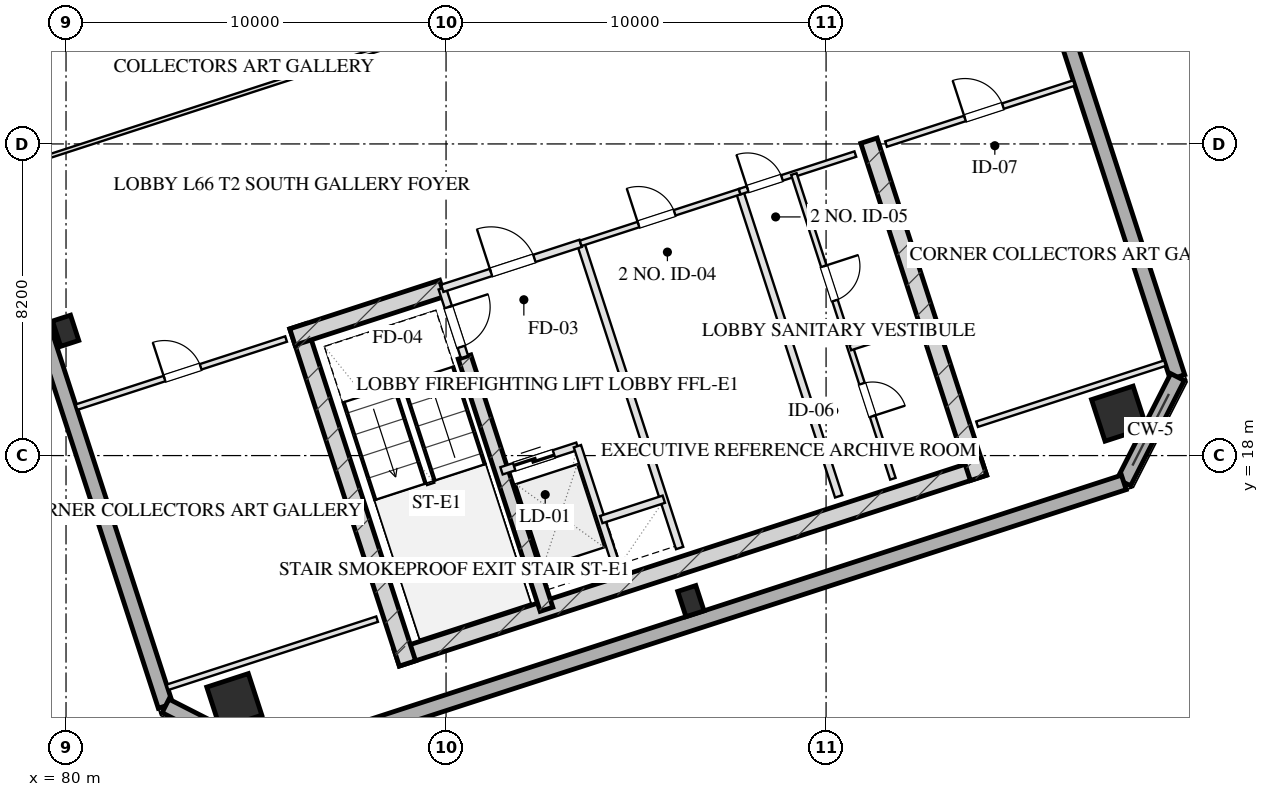
"""IFC4 building model, lengths in metres.
Left out: names, types, materials, properties, quantities, classifications, styles, units other than length and angle.
Written with IfcOpenShell. Run it as: python <this file> out.ifc"""

import sys

from ifc_helpers import new_model, si_unit, direction, frame, frame_2d, origin, origin_2d, place, context, subcontext, project, spatial, rectangle, hollow_rectangle, extrude, element, fill, save


model = new_model("IFC4")
c1 = context("Model", 3, precision=1e-05, world=origin(), true_north=direction((0.0, 1.0)))
c2 = subcontext(c1, "Body", "Model", "MODEL_VIEW")
j1 = project(units=[si_unit("LENGTHUNIT", "METRE"), si_unit("PLANEANGLEUNIT", "RADIAN")], contexts=[c1])
p1 = place(None, origin())
s1 = spatial("IfcSite", under=j1, at=p1, CompositionType="ELEMENT")
p2 = place(p1, origin())
s2 = spatial("IfcBuilding", under=s1, at=p2, CompositionType="ELEMENT")
p3 = place(p2, frame((0.0, 0.0, 244.0)))
s3 = spatial("IfcBuildingStorey", under=s2, at=p3, CompositionType="ELEMENT", Elevation=244.0)
p4 = place(p3, frame((88.701, 12.675, 0.0), z_axis=(0.0, 0.0, 1.0), x_axis=(0.95105824505, 0.309011673763, 0.0)))
e1 = element("IfcWall", 1, at=p4, inside=s3, PredefinedType="SHEAR", context=c2, shape_type="SweptSolid", body=[
    extrude(rectangle(XDim=16.25, YDim=0.45, at=frame_2d((8.125, 0.0))), origin(), (0.0, 0.0, 1.0), 3.2),
])
for number, where, z_axis, x_axis in (
    (2, (86.102, 21.404, 0.0), (0.0, 0.0, 1.0), (0.309, -0.951, 0.0)),
    (3, (101.128, 26.286, 0.0), (0.0, 0.0, 1.0), (0.309, -0.951, 0.0)),
):
    element("IfcWall", number, at=place(p3, frame(where, z_axis=z_axis, x_axis=x_axis)), inside=s3, PredefinedType="SHEAR", context=c2, shape_type="SweptSolid", body=[
        extrude(rectangle(XDim=9.33, YDim=0.45, at=frame_2d((4.665, 0.0))), origin(), (0.0, 0.0, 1.0), 3.2),
    ])
p5 = place(p3, frame((90.486, 20.594, 0.0), z_axis=(0.0, 0.0, 1.0), x_axis=(0.309020428229, -0.951055400562, 0.0)))
e4 = element("IfcWall", 4, at=p5, inside=s3, PredefinedType="SHEAR", context=c2, shape_type="SweptSolid", body=[
    extrude(rectangle(XDim=6.98, YDim=0.35, at=frame_2d((3.49, 0.0))), origin(), (0.0, 0.0, 1.0), 3.2),
])
p6 = place(p3, frame((85.957, 21.12, 0.0), z_axis=(0.0, 0.0, 1.0), x_axis=(0.951064796122, 0.308991510526, 0.0)))
e5 = element("IfcWall", 5, at=p6, inside=s3, PredefinedType="SHEAR", context=c2, shape_type="SweptSolid", body=[
    extrude(rectangle(XDim=4.145, YDim=0.45, at=frame_2d((2.073, 0.0))), origin(), (0.0, 0.0, 1.0), 3.2),
])
for number, where, z_axis, x_axis in (
    (6, (84.428, 11.539, 0.0), (0.0, 0.0, 1.0), (0.951, 0.309, 0.0)),
    (7, (107.71, 19.104, 0.0), (0.0, 0.0, 1.0), (0.951, 0.309, 0.0)),
):
    element("IfcColumn", number, at=place(p3, frame(where, z_axis=z_axis, x_axis=x_axis)), inside=s3, PredefinedType="COLUMN", context=c2, shape_type="SweptSolid", body=[
        extrude(hollow_rectangle(XDim=1.15, YDim=1.15, WallThickness=0.04, at=origin_2d()), origin(), (0.0, 0.0, 1.0), 3.201),
    ])
for number, where, z_axis, x_axis in (
    (8, (79.99, 21.284, 0.0), (0.0, 0.0, 1.0), (0.951, 0.309, 0.0)),
    (9, (96.443, 14.17, 0.0), (0.0, 0.0, 1.0), (0.951, 0.309, 0.0)),
):
    element("IfcColumn", number, at=place(p3, frame(where, z_axis=z_axis, x_axis=x_axis)), inside=s3, PredefinedType="COLUMN", context=c2, shape_type="SweptSolid", body=[
        extrude(hollow_rectangle(XDim=0.5, YDim=0.7, WallThickness=0.025, at=origin_2d()), origin(), (0.0, 0.0, 1.0), 3.201),
    ])
p7 = place(p3, frame((82.618, 11.414, 0.0), z_axis=(0.0, 0.0, 1.0), x_axis=(-0.309016491071, 0.951056679828, 0.0)))
e10 = element("IfcWall", 10, at=p7, inside=s3, PredefinedType="SOLIDWALL", context=c2, shape_type="SweptSolid", body=[
    extrude(rectangle(XDim=38.4, YDim=0.4, at=frame_2d((19.2, 0.0))), origin(), (0.0, 0.0, 1.0), 2.36),
])
p8 = place(p7, frame((11.825, 0.0, 0.75)))
e11 = element("IfcOpeningElement", 11, at=p8, cuts=e10, PredefinedType="OPENING", context=c2, shape_type="SweptSolid", body=[
    extrude(rectangle(XDim=1.95, YDim=1.21, at=frame_2d((0.975, 0.605))), frame((0.0, 0.21, 0.0), z_axis=(0.0, -1.0, 0.0), x_axis=(1.0, 0.0, 0.0)), (0.0, 0.0, 1.0), 0.42),
])
p9 = place(p7, frame((15.625, 0.0, 0.75)))
e12 = element("IfcOpeningElement", 12, at=p9, cuts=e10, PredefinedType="OPENING", context=c2, shape_type="SweptSolid", body=[
    extrude(rectangle(XDim=1.95, YDim=1.21, at=frame_2d((0.975, 0.605))), frame((0.0, 0.21, 0.0), z_axis=(0.0, -1.0, 0.0), x_axis=(1.0, 0.0, 0.0)), (0.0, 0.0, 1.0), 0.42),
])
p10 = place(p7, frame((20.825, 0.0, 0.75)))
e13 = element("IfcOpeningElement", 13, at=p10, cuts=e10, PredefinedType="OPENING", context=c2, shape_type="SweptSolid", body=[
    extrude(rectangle(XDim=1.95, YDim=1.21, at=frame_2d((0.975, 0.605))), frame((0.0, 0.21, 0.0), z_axis=(0.0, -1.0, 0.0), x_axis=(1.0, 0.0, 0.0)), (0.0, 0.0, 1.0), 0.42),
])
p11 = place(p7, frame((24.625, 0.0, 0.75)))
e14 = element("IfcOpeningElement", 14, at=p11, cuts=e10, PredefinedType="OPENING", context=c2, shape_type="SweptSolid", body=[
    extrude(rectangle(XDim=1.95, YDim=1.21, at=frame_2d((0.975, 0.605))), frame((0.0, 0.21, 0.0), z_axis=(0.0, -1.0, 0.0), x_axis=(1.0, 0.0, 0.0)), (0.0, 0.0, 1.0), 0.42),
])
p12 = place(p3, frame((97.382, 56.586, 0.0), z_axis=(0.0, 0.0, 1.0), x_axis=(0.309016491071, -0.951056679828, 0.0)))
e15 = element("IfcWall", 15, at=p12, inside=s3, PredefinedType="SOLIDWALL", context=c2, shape_type="SweptSolid", body=[
    extrude(rectangle(XDim=38.4, YDim=0.4, at=frame_2d((19.2, 0.0))), origin(), (0.0, 0.0, 1.0), 2.36),
])
p13 = place(p12, frame((24.625, 0.0, 0.75)))
e16 = element("IfcOpeningElement", 16, at=p13, cuts=e15, PredefinedType="OPENING", context=c2, shape_type="SweptSolid", body=[
    extrude(rectangle(XDim=1.95, YDim=1.21, at=frame_2d((0.975, 0.605))), frame((0.0, 0.21, 0.0), z_axis=(0.0, -1.0, 0.0), x_axis=(1.0, 0.0, 0.0)), (0.0, 0.0, 1.0), 0.42),
])
p14 = place(p12, frame((20.825, 0.0, 0.75)))
e17 = element("IfcOpeningElement", 17, at=p14, cuts=e15, PredefinedType="OPENING", context=c2, shape_type="SweptSolid", body=[
    extrude(rectangle(XDim=1.95, YDim=1.21, at=frame_2d((0.975, 0.605))), frame((0.0, 0.21, 0.0), z_axis=(0.0, -1.0, 0.0), x_axis=(1.0, 0.0, 0.0)), (0.0, 0.0, 1.0), 0.42),
])
p15 = place(p12, frame((15.625, 0.0, 0.75)))
e18 = element("IfcOpeningElement", 18, at=p15, cuts=e15, PredefinedType="OPENING", context=c2, shape_type="SweptSolid", body=[
    extrude(rectangle(XDim=1.95, YDim=1.21, at=frame_2d((0.975, 0.605))), frame((0.0, 0.21, 0.0), z_axis=(0.0, -1.0, 0.0), x_axis=(1.0, 0.0, 0.0)), (0.0, 0.0, 1.0), 0.42),
])
p16 = place(p12, frame((11.825, 0.0, 0.75)))
e19 = element("IfcOpeningElement", 19, at=p16, cuts=e15, PredefinedType="OPENING", context=c2, shape_type="SweptSolid", body=[
    extrude(rectangle(XDim=1.95, YDim=1.21, at=frame_2d((0.975, 0.605))), frame((0.0, 0.21, 0.0), z_axis=(0.0, -1.0, 0.0), x_axis=(1.0, 0.0, 0.0)), (0.0, 0.0, 1.0), 0.42),
])
p17 = place(p3, frame((109.248, 20.066, 0.0), z_axis=(0.0, 0.0, 1.0), x_axis=(-0.453949291228, -0.891027519774, 0.0)))
e20 = element("IfcWall", 20, at=p17, inside=s3, PredefinedType="SOLIDWALL", context=c2, shape_type="SweptSolid", body=[
    extrude(rectangle(XDim=3.111, YDim=0.4, at=frame_2d((1.556, 0.0))), origin(), (0.0, 0.0, 1.0), 2.36),
])
p18 = place(p3, frame((107.835, 17.294, 0.0), z_axis=(0.0, 0.0, 1.0), x_axis=(-0.951058012937, -0.309012388148, 0.0)))
e21 = element("IfcWall", 21, at=p18, inside=s3, PredefinedType="SOLIDWALL", context=c2, shape_type="SweptSolid", body=[
    extrude(rectangle(XDim=23.6, YDim=0.4, at=frame_2d((11.8, 0.0))), origin(), (0.0, 0.0, 1.0), 2.36),
])
p19 = place(p3, frame((85.39, 10.001, 0.0), z_axis=(0.0, 0.0, 1.0), x_axis=(-0.890979603174, 0.454043331334, 0.0)))
e22 = element("IfcWall", 22, at=p19, inside=s3, PredefinedType="SOLIDWALL", context=c2, shape_type="SweptSolid", body=[
    extrude(rectangle(XDim=3.111, YDim=0.4, at=frame_2d((1.556, 0.0))), origin(), (0.0, 0.0, 1.0), 2.36),
])
p20 = place(p3, frame((89.899, 22.401, 0.0), z_axis=(0.0, 0.0, 1.0), x_axis=(0.308932062672, -0.951084108086, 0.0)))
e23 = element("IfcWall", 23, at=p20, inside=s3, PredefinedType="PARTITIONING", context=c2, shape_type="SweptSolid", body=[
    extrude(rectangle(XDim=1.9, YDim=0.2, at=frame_2d((0.95, 0.0))), origin(), (0.0, 0.0, 1.0), 2.925),
])
p21 = place(p20, frame((0.52, 0.0, 0.0)))
e24 = element("IfcOpeningElement", 24, at=p21, cuts=e23, PredefinedType="OPENING", context=c2, shape_type="SweptSolid", body=[
    extrude(rectangle(XDim=1.1, YDim=2.05, at=frame_2d((0.55, 1.025))), frame((0.0, 0.11, 0.0), z_axis=(0.0, -1.0, 0.0), x_axis=(1.0, 0.0, 0.0)), (0.0, 0.0, 1.0), 0.22),
])
p22 = place(p3, frame((93.542, 23.585, 0.0), z_axis=(0.0, 0.0, 1.0), x_axis=(0.309042196757, -0.951048327176, 0.0)))
e25 = element("IfcWall", 25, at=p22, inside=s3, PredefinedType="PARTITIONING", context=c2, shape_type="SweptSolid", body=[
    extrude(rectangle(XDim=8.43, YDim=0.2, at=frame_2d((4.215, 0.0))), origin(), (0.0, 0.0, 1.0), 2.925),
])
p23 = place(p3, frame((89.899, 22.401, 0.0), z_axis=(0.0, 0.0, 1.0), x_axis=(0.951046716504, 0.309047153403, 0.0)))
e26 = element("IfcWall", 26, at=p23, inside=s3, PredefinedType="PARTITIONING", context=c2, shape_type="SweptSolid", body=[
    extrude(rectangle(XDim=3.83, YDim=0.2, at=frame_2d((1.915, 0.0))), origin(), (0.0, 0.0, 1.0), 2.925),
])
p24 = place(p23, frame((1.35, 0.0, 0.0)))
e27 = element("IfcOpeningElement", 27, at=p24, cuts=e26, PredefinedType="OPENING", context=c2, shape_type="SweptSolid", body=[
    extrude(rectangle(XDim=1.2, YDim=2.05, at=frame_2d((0.6, 1.025))), frame((0.0, 0.11, 0.0), z_axis=(0.0, -1.0, 0.0), x_axis=(1.0, 0.0, 0.0)), (0.0, 0.0, 1.0), 0.22),
])
p25 = place(p3, frame((91.46, 17.598, 0.0), z_axis=(0.0, 0.0, 1.0), x_axis=(0.951062257173, 0.308999325213, 0.0)))
e28 = element("IfcWall", 28, at=p25, inside=s3, PredefinedType="PARTITIONING", context=c2, shape_type="SweptSolid", body=[
    extrude(rectangle(XDim=2.1, YDim=0.2, at=frame_2d((1.05, 0.0))), origin(), (0.0, 0.0, 1.0), 2.925),
])
p26 = place(p25, frame((0.35, 0.0, 0.0)))
e29 = element("IfcOpeningElement", 29, at=p26, cuts=e28, PredefinedType="OPENING", context=c2, shape_type="SweptSolid", body=[
    extrude(rectangle(XDim=1.1, YDim=2.05, at=frame_2d((0.55, 1.025))), frame((0.0, 0.11, 0.0), z_axis=(0.0, -1.0, 0.0), x_axis=(1.0, 0.0, 0.0)), (0.0, 0.0, 1.0), 0.22),
])
p27 = place(p3, frame((93.457, 18.247, 0.0), z_axis=(0.0, 0.0, 1.0), x_axis=(0.3089935693, -0.951064127245, 0.0)))
e30 = element("IfcWall", 30, at=p27, inside=s3, PredefinedType="PARTITIONING", context=c2, shape_type="SweptSolid", body=[
    extrude(rectangle(XDim=3.7, YDim=0.2, at=frame_2d((1.85, 0.0))), origin(), (0.0, 0.0, 1.0), 2.925),
])
p28 = place(p3, frame((94.084, 16.317, 0.0), z_axis=(0.0, 0.0, 1.0), x_axis=(0.951041328149, 0.309063734775, 0.0)))
e31 = element("IfcWall", 31, at=p28, inside=s3, PredefinedType="PARTITIONING", context=c2, shape_type="SweptSolid", body=[
    extrude(rectangle(XDim=1.73, YDim=0.2, at=frame_2d((0.865, 0.0))), origin(), (0.0, 0.0, 1.0), 2.925),
])
p29 = place(p3, frame((97.727, 24.944, 0.0), z_axis=(0.0, 0.0, 1.0), x_axis=(0.309016001439, -0.951056838919, 0.0)))
e32 = element("IfcWall", 32, at=p29, inside=s3, PredefinedType="PARTITIONING", context=c2, shape_type="SweptSolid", body=[
    extrude(rectangle(XDim=8.43, YDim=0.2, at=frame_2d((4.215, 0.0))), origin(), (0.0, 0.0, 1.0), 2.925),
])
p30 = place(p3, frame((93.542, 23.585, 0.0), z_axis=(0.0, 0.0, 1.0), x_axis=(0.951063829732, 0.308994485023, 0.0)))
e33 = element("IfcWall", 33, at=p30, inside=s3, PredefinedType="PARTITIONING", context=c2, shape_type="SweptSolid", body=[
    extrude(rectangle(XDim=4.4, YDim=0.15, at=frame_2d((2.2, 0.0))), origin(), (0.0, 0.0, 1.0), 2.925),
])
p31 = place(p30, frame((1.6, 0.0, 0.0)))
e34 = element("IfcOpeningElement", 34, at=p31, cuts=e33, PredefinedType="OPENING", context=c2, shape_type="SweptSolid", body=[
    extrude(rectangle(XDim=1.0, YDim=2.05, at=frame_2d((0.5, 1.025))), frame((0.0, 0.085, 0.0), z_axis=(0.0, -1.0, 0.0), x_axis=(1.0, 0.0, 0.0)), (0.0, 0.0, 1.0), 0.17),
])
p32 = place(p3, frame((97.727, 24.944, 0.0), z_axis=(0.0, 0.0, 1.0), x_axis=(0.951036872128, 0.309077446369, 0.0)))
e35 = element("IfcWall", 35, at=p32, inside=s3, PredefinedType="PARTITIONING", context=c2, shape_type="SweptSolid", body=[
    extrude(rectangle(XDim=3.2, YDim=0.15, at=frame_2d((1.6, 0.0))), origin(), (0.0, 0.0, 1.0), 2.925),
])
p33 = place(p32, frame((0.22, 0.0, 0.0)))
e36 = element("IfcOpeningElement", 36, at=p33, cuts=e35, PredefinedType="OPENING", context=c2, shape_type="SweptSolid", body=[
    extrude(rectangle(XDim=0.95, YDim=2.05, at=frame_2d((0.475, 1.025))), frame((0.0, 0.085, 0.0), z_axis=(0.0, -1.0, 0.0), x_axis=(1.0, 0.0, 0.0)), (0.0, 0.0, 1.0), 0.17),
])
p34 = place(p3, frame((99.153, 25.408, 0.0), z_axis=(0.0, 0.0, 1.0), x_axis=(0.309016001439, -0.951056838919, 0.0)))
e37 = element("IfcWall", 37, at=p34, inside=s3, PredefinedType="PARTITIONING", context=c2, shape_type="SweptSolid", body=[
    extrude(rectangle(XDim=8.43, YDim=0.15, at=frame_2d((4.215, 0.0))), origin(), (0.0, 0.0, 1.0), 2.925),
])
p35 = place(p34, frame((2.55, 0.0, 0.0)))
e38 = element("IfcOpeningElement", 38, at=p35, cuts=e37, PredefinedType="OPENING", context=c2, shape_type="SweptSolid", body=[
    extrude(rectangle(XDim=0.95, YDim=2.05, at=frame_2d((0.475, 1.025))), frame((0.0, 0.085, 0.0), z_axis=(0.0, -1.0, 0.0), x_axis=(1.0, 0.0, 0.0)), (0.0, 0.0, 1.0), 0.17),
])
p36 = place(p34, frame((5.8, 0.0, 0.0)))
e39 = element("IfcOpeningElement", 39, at=p36, cuts=e37, PredefinedType="OPENING", context=c2, shape_type="SweptSolid", body=[
    extrude(rectangle(XDim=0.9, YDim=2.05, at=frame_2d((0.45, 1.025))), frame((0.0, 0.085, 0.0), z_axis=(0.0, -1.0, 0.0), x_axis=(1.0, 0.0, 0.0)), (0.0, 0.0, 1.0), 0.17),
])
p37 = place(p3, frame((100.636, 20.843, 0.0), z_axis=(0.0, 0.0, 1.0), x_axis=(0.951040401051, 0.309066587596, 0.0)))
e40 = element("IfcWall", 40, at=p37, inside=s3, PredefinedType="PARTITIONING", context=c2, shape_type="SweptSolid", body=[
    extrude(rectangle(XDim=1.7, YDim=0.15, at=frame_2d((0.85, 0.0))), origin(), (0.0, 0.0, 1.0), 2.925),
])
p38 = place(p3, frame((82.669, 11.903, 0.0), z_axis=(0.0, 0.0, 1.0), x_axis=(0.951059431056, 0.309008023519, 0.0)))
e41 = element("IfcWall", 41, at=p38, inside=s3, PredefinedType="PARTITIONING", context=c2, shape_type="SweptSolid", body=[
    extrude(rectangle(XDim=5.8, YDim=0.15, at=frame_2d((2.9, 0.0))), origin(), (0.0, 0.0, 1.0), 2.925),
])
p39 = place(p3, frame((80.275, 19.274, 0.0), z_axis=(0.0, 0.0, 1.0), x_axis=(0.951059431056, 0.309008023519, 0.0)))
e42 = element("IfcWall", 42, at=p39, inside=s3, PredefinedType="PARTITIONING", context=c2, shape_type="SweptSolid", body=[
    extrude(rectangle(XDim=5.8, YDim=0.15, at=frame_2d((2.9, 0.0))), origin(), (0.0, 0.0, 1.0), 2.925),
])
p40 = place(p39, frame((2.436, 0.0, 0.0)))
e43 = element("IfcOpeningElement", 43, at=p40, cuts=e42, PredefinedType="OPENING", context=c2, shape_type="SweptSolid", body=[
    extrude(rectangle(XDim=1.0, YDim=2.05, at=frame_2d((0.5, 1.025))), frame((0.0, 0.085, 0.0), z_axis=(0.0, -1.0, 0.0), x_axis=(1.0, 0.0, 0.0)), (0.0, 0.0, 1.0), 0.17),
])
p41 = place(p3, frame((103.973, 18.825, 0.0), z_axis=(0.0, 0.0, 1.0), x_axis=(0.951055112834, 0.309021313752, 0.0)))
e44 = element("IfcWall", 44, at=p41, inside=s3, PredefinedType="PARTITIONING", context=c2, shape_type="SweptSolid", body=[
    extrude(rectangle(XDim=5.2, YDim=0.15, at=frame_2d((2.6, 0.0))), origin(), (0.0, 0.0, 1.0), 2.925),
])
p42 = place(p3, frame((101.578, 26.196, 0.0), z_axis=(0.0, 0.0, 1.0), x_axis=(0.951064427824, 0.308992644131, 0.0)))
e45 = element("IfcWall", 45, at=p42, inside=s3, PredefinedType="PARTITIONING", context=c2, shape_type="SweptSolid", body=[
    extrude(rectangle(XDim=5.2, YDim=0.15, at=frame_2d((2.6, 0.0))), origin(), (0.0, 0.0, 1.0), 2.925),
])
p43 = place(p42, frame((2.184, 0.0, 0.0)))
e46 = element("IfcOpeningElement", 46, at=p43, cuts=e45, PredefinedType="OPENING", context=c2, shape_type="SweptSolid", body=[
    extrude(rectangle(XDim=1.05, YDim=2.05, at=frame_2d((0.525, 1.025))), frame((0.0, 0.085, 0.0), z_axis=(0.0, -1.0, 0.0), x_axis=(1.0, 0.0, 0.0)), (0.0, 0.0, 1.0), 0.17),
])
p44 = place(p3, frame((78.266, 25.456, 0.0), z_axis=(0.0, 0.0, 1.0), x_axis=(0.951056346912, 0.309017515681, 0.0)))
e47 = element("IfcWall", 47, at=p44, inside=s3, PredefinedType="MOVABLE", context=c2, shape_type="SweptSolid", body=[
    extrude(rectangle(XDim=14.575, YDim=0.1, at=frame_2d((7.288, 0.0))), origin(), (0.0, 0.0, 1.0), 2.925),
])
p45 = place(p21, origin())
e48 = element("IfcDoor", 48, at=p45, inside=s3, OperationType="SINGLE_SWING_LEFT", PredefinedType="DOOR", context=c2, shape_type="SweptSolid", body=[
    extrude(rectangle(XDim=1.1, YDim=2.05, at=frame_2d((0.55, 1.025))), frame((0.0, 0.025, 0.0), z_axis=(0.0, -1.0, 0.0), x_axis=(1.0, 0.0, 0.0)), (0.0, 0.0, 1.0), 0.05),
])
fill(e24, e48)
p46 = place(p24, origin())
e49 = element("IfcDoor", 49, at=p46, inside=s3, OperationType="SINGLE_SWING_LEFT", PredefinedType="DOOR", context=c2, shape_type="SweptSolid", body=[
    extrude(rectangle(XDim=1.2, YDim=2.05, at=frame_2d((0.6, 1.025))), frame((0.0, 0.025, 0.0), z_axis=(0.0, -1.0, 0.0), x_axis=(1.0, 0.0, 0.0)), (0.0, 0.0, 1.0), 0.05),
])
fill(e27, e49)
p47 = place(p26, origin())
e50 = element("IfcDoor", 50, at=p47, inside=s3, OperationType="DOUBLE_DOOR_SLIDING", PredefinedType="DOOR", context=c2, shape_type="SweptSolid", body=[
    extrude(rectangle(XDim=1.1, YDim=2.05, at=frame_2d((0.55, 1.025))), frame((0.0, 0.025, 0.0), z_axis=(0.0, -1.0, 0.0), x_axis=(1.0, 0.0, 0.0)), (0.0, 0.0, 1.0), 0.05),
])
fill(e29, e50)
p48 = place(p31, origin())
e51 = element("IfcDoor", 51, at=p48, inside=s3, OperationType="SINGLE_SWING_LEFT", PredefinedType="DOOR", context=c2, shape_type="SweptSolid", body=[
    extrude(rectangle(XDim=1.0, YDim=2.05, at=frame_2d((0.5, 1.025))), frame((0.0, 0.025, 0.0), z_axis=(0.0, -1.0, 0.0), x_axis=(1.0, 0.0, 0.0)), (0.0, 0.0, 1.0), 0.05),
])
fill(e34, e51)
p49 = place(p33, origin())
e52 = element("IfcDoor", 52, at=p49, inside=s3, OperationType="SINGLE_SWING_LEFT", PredefinedType="DOOR", context=c2, shape_type="SweptSolid", body=[
    extrude(rectangle(XDim=0.95, YDim=2.05, at=frame_2d((0.475, 1.025))), frame((0.0, 0.025, 0.0), z_axis=(0.0, -1.0, 0.0), x_axis=(1.0, 0.0, 0.0)), (0.0, 0.0, 1.0), 0.05),
])
fill(e36, e52)
p50 = place(p35, origin())
e53 = element("IfcDoor", 53, at=p50, inside=s3, OperationType="SINGLE_SWING_LEFT", PredefinedType="DOOR", context=c2, shape_type="SweptSolid", body=[
    extrude(rectangle(XDim=0.95, YDim=2.05, at=frame_2d((0.475, 1.025))), frame((0.0, 0.025, 0.0), z_axis=(0.0, -1.0, 0.0), x_axis=(1.0, 0.0, 0.0)), (0.0, 0.0, 1.0), 0.05),
])
fill(e38, e53)
p51 = place(p36, origin())
e54 = element("IfcDoor", 54, at=p51, inside=s3, OperationType="SINGLE_SWING_RIGHT", PredefinedType="DOOR", context=c2, shape_type="SweptSolid", body=[
    extrude(rectangle(XDim=0.9, YDim=2.05, at=frame_2d((0.45, 1.025))), frame((0.0, 0.025, 0.0), z_axis=(0.0, -1.0, 0.0), x_axis=(1.0, 0.0, 0.0)), (0.0, 0.0, 1.0), 0.05),
])
fill(e39, e54)
p52 = place(p40, origin())
e55 = element("IfcDoor", 55, at=p52, inside=s3, OperationType="SINGLE_SWING_LEFT", PredefinedType="DOOR", context=c2, shape_type="SweptSolid", body=[
    extrude(rectangle(XDim=1.0, YDim=2.05, at=frame_2d((0.5, 1.025))), frame((0.0, 0.025, 0.0), z_axis=(0.0, -1.0, 0.0), x_axis=(1.0, 0.0, 0.0)), (0.0, 0.0, 1.0), 0.05),
])
fill(e43, e55)
p53 = place(p43, origin())
e56 = element("IfcDoor", 56, at=p53, inside=s3, OperationType="SINGLE_SWING_LEFT", PredefinedType="DOOR", context=c2, shape_type="SweptSolid", body=[
    extrude(rectangle(XDim=1.05, YDim=2.05, at=frame_2d((0.525, 1.025))), frame((0.0, 0.025, 0.0), z_axis=(0.0, -1.0, 0.0), x_axis=(1.0, 0.0, 0.0)), (0.0, 0.0, 1.0), 0.05),
])
fill(e46, e56)
save(model, sys.argv[1])
